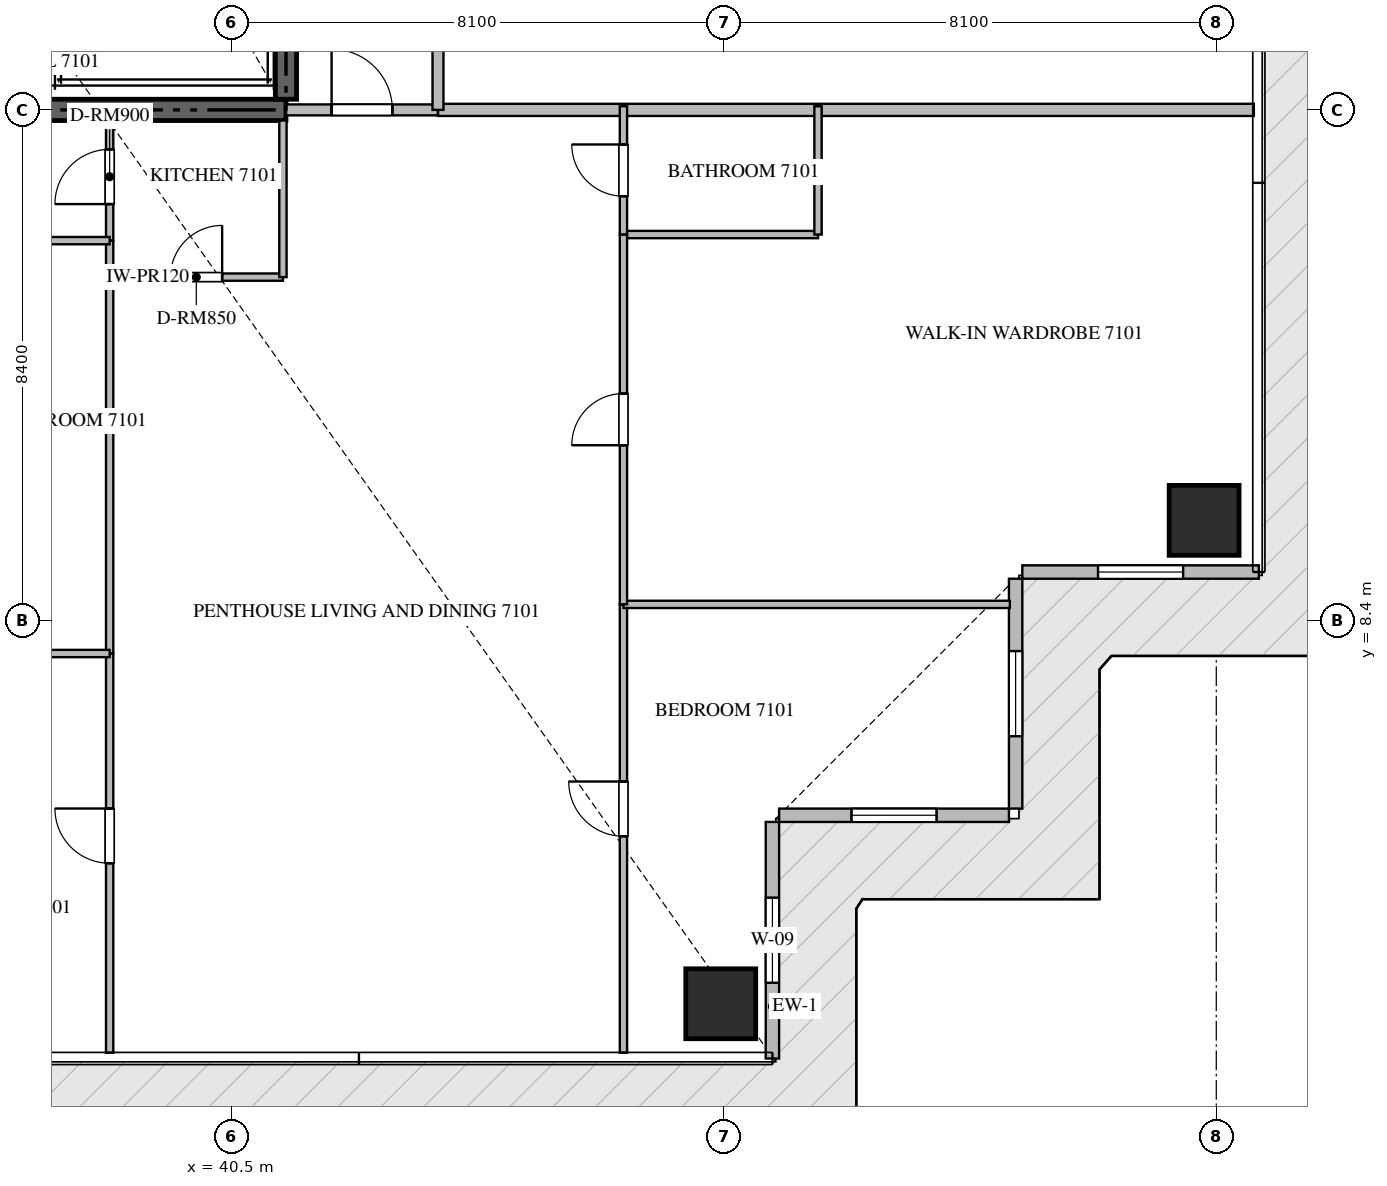
"""IFC4 building model, lengths in metres.
Left out: names, types, materials, properties, quantities, classifications, styles, units other than length and angle.
Written with IfcOpenShell. Run it as: python <this file> out.ifc"""

import sys

from ifc_helpers import new_model, si_unit, direction, frame, frame_2d, origin, origin_2d, place, context, subcontext, project, spatial, rectangle, extrude, source, transform, mapped, element, fill, save


model = new_model("IFC4")
c1 = context("Model", 3, precision=1e-05, world=origin(), true_north=direction((0.0, 1.0)))
c2 = subcontext(c1, "Body", "Model", "MODEL_VIEW")
j1 = project(units=[si_unit("LENGTHUNIT", "METRE"), si_unit("PLANEANGLEUNIT", "RADIAN")], contexts=[c1])
p1 = place(None, origin())
s1 = spatial("IfcSite", under=j1, at=p1, CompositionType="ELEMENT")
p2 = place(p1, origin())
s2 = spatial("IfcBuilding", under=s1, at=p2, CompositionType="ELEMENT")
p3 = place(p2, frame((0.0, 0.0, 283.6)))
s3 = spatial("IfcBuildingStorey", under=s2, at=p3, CompositionType="ELEMENT", Elevation=283.6)
p4 = place(p3, frame((23.4, 16.8, -0.26), z_axis=(0.0, 0.0, 1.0), x_axis=(1.0, 0.0, 0.0)))
e1 = element("IfcWall", 1, at=p4, inside=s3, PredefinedType="SHEAR", context=c2, shape_type="SweptSolid", body=[
    extrude(rectangle(XDim=18.0, YDim=0.35, at=frame_2d((9.0, 0.0))), origin(), (0.0, 0.0, 1.0), 3.668),
])
p5 = place(p3, frame((41.4, 16.975, -0.26), z_axis=(0.0, 0.0, 1.0), x_axis=(0.0, 1.0, 0.0)))
e2 = element("IfcWall", 2, at=p5, inside=s3, PredefinedType="SHEAR", context=c2, shape_type="SweptSolid", body=[
    extrude(rectangle(XDim=8.375, YDim=0.35, at=frame_2d((4.188, 0.0))), origin(), (0.0, 0.0, 1.0), 3.668),
])
m1 = source(origin(), c2, "Body", "SweptSolid", [
    extrude(rectangle(XDim=1.15, YDim=1.15, at=origin_2d()), origin(), (0.0, 0.0, 1.0), 3.67),
])
for number, where, z_axis, x_axis in (
    (3, (48.55, 2.1, -0.26), (0.0, 0.0, 1.0), (1.0, 0.0, 0.0)),
    (4, (56.5, 10.05, -0.26), (0.0, 0.0, 1.0), (1.0, 0.0, 0.0)),
):
    element("IfcColumn", number, at=place(p3, frame(where, z_axis=z_axis, x_axis=x_axis)), inside=s3, PredefinedType="COLUMN", context=c2, shape_type="MappedRepresentation", body=[
        mapped(m1, transform((0.0, 0.0, 0.0), scale=1.0)),
    ])
p6 = place(p3, frame((49.4, 1.2, 0.0), z_axis=(0.0, 0.0, 1.0), x_axis=(0.0, 1.0, 0.0)))
e5 = element("IfcWall", 5, at=p6, inside=s3, PredefinedType="ELEMENTEDWALL", context=c2, shape_type="SweptSolid", body=[
    extrude(rectangle(XDim=3.89, YDim=0.22, at=frame_2d((1.945, 0.0))), origin(), (0.0, 0.0, 1.0), 3.395),
])
p7 = place(p6, frame((1.245, 0.0, 0.65)))
e6 = element("IfcOpeningElement", 6, at=p7, cuts=e5, PredefinedType="OPENING", context=c2, shape_type="SweptSolid", body=[
    extrude(rectangle(XDim=1.4, YDim=1.35, at=frame_2d((0.7, 0.675))), frame((0.0, 0.12, 0.0), z_axis=(0.0, -1.0, 0.0), x_axis=(1.0, 0.0, 0.0)), (0.0, 0.0, 1.0), 0.24),
])
p8 = place(p3, frame((49.51, 5.2, 0.0), z_axis=(0.0, 0.0, 1.0), x_axis=(1.0, 0.0, 0.0)))
e7 = element("IfcWall", 7, at=p8, inside=s3, PredefinedType="ELEMENTEDWALL", context=c2, shape_type="SweptSolid", body=[
    extrude(rectangle(XDim=3.78, YDim=0.22, at=frame_2d((1.89, 0.0))), origin(), (0.0, 0.0, 1.0), 3.395),
])
p9 = place(p8, frame((1.19, 0.0, 0.65)))
e8 = element("IfcOpeningElement", 8, at=p9, cuts=e7, PredefinedType="OPENING", context=c2, shape_type="SweptSolid", body=[
    extrude(rectangle(XDim=1.4, YDim=1.35, at=frame_2d((0.7, 0.675))), frame((0.0, 0.12, 0.0), z_axis=(0.0, -1.0, 0.0), x_axis=(1.0, 0.0, 0.0)), (0.0, 0.0, 1.0), 0.24),
])
p10 = place(p3, frame((53.4, 5.31, 0.0), z_axis=(0.0, 0.0, 1.0), x_axis=(0.0, 1.0, 0.0)))
e9 = element("IfcWall", 9, at=p10, inside=s3, PredefinedType="ELEMENTEDWALL", context=c2, shape_type="SweptSolid", body=[
    extrude(rectangle(XDim=3.78, YDim=0.22, at=frame_2d((1.89, 0.0))), origin(), (0.0, 0.0, 1.0), 3.395),
])
p11 = place(p10, frame((1.19, 0.0, 0.65)))
e10 = element("IfcOpeningElement", 10, at=p11, cuts=e9, PredefinedType="OPENING", context=c2, shape_type="SweptSolid", body=[
    extrude(rectangle(XDim=1.4, YDim=1.35, at=frame_2d((0.7, 0.675))), frame((0.0, 0.12, 0.0), z_axis=(0.0, -1.0, 0.0), x_axis=(1.0, 0.0, 0.0)), (0.0, 0.0, 1.0), 0.24),
])
p12 = place(p3, frame((53.51, 9.2, 0.0), z_axis=(0.0, 0.0, 1.0), x_axis=(1.0, 0.0, 0.0)))
e11 = element("IfcWall", 11, at=p12, inside=s3, PredefinedType="ELEMENTEDWALL", context=c2, shape_type="SweptSolid", body=[
    extrude(rectangle(XDim=3.89, YDim=0.22, at=frame_2d((1.945, 0.0))), origin(), (0.0, 0.0, 1.0), 3.395),
])
p13 = place(p12, frame((1.245, 0.0, 0.65)))
e12 = element("IfcOpeningElement", 12, at=p13, cuts=e11, PredefinedType="OPENING", context=c2, shape_type="SweptSolid", body=[
    extrude(rectangle(XDim=1.4, YDim=1.35, at=frame_2d((0.7, 0.675))), frame((0.0, 0.12, 0.0), z_axis=(0.0, -1.0, 0.0), x_axis=(1.0, 0.0, 0.0)), (0.0, 0.0, 1.0), 0.24),
])
p14 = place(p3, frame((43.9, 16.8, 0.0), z_axis=(0.0, 0.0, 1.0), x_axis=(1.0, 0.0, 0.0)))
e13 = element("IfcWall", 13, at=p14, inside=s3, PredefinedType="PARTITIONING", context=c2, shape_type="SweptSolid", body=[
    extrude(rectangle(XDim=13.418, YDim=0.2, at=frame_2d((6.709, 0.0))), origin(), (0.0, 0.0, 1.0), 3.41),
])
p15 = place(p3, frame((41.402, 16.8, 0.0), z_axis=(0.0, 0.0, 1.0), x_axis=(1.0, 0.0, 0.0)))
e14 = element("IfcWall", 14, at=p15, inside=s3, PredefinedType="PARTITIONING", context=c2, shape_type="SweptSolid", body=[
    extrude(rectangle(XDim=2.496, YDim=0.18, at=frame_2d((1.248, 0.0))), origin(), (0.0, 0.0, 1.0), 3.41),
])
p16 = place(p15, frame((0.748, 0.0, 0.0)))
e15 = element("IfcOpeningElement", 15, at=p16, cuts=e14, PredefinedType="OPENING", context=c2, shape_type="SweptSolid", body=[
    extrude(rectangle(XDim=1.0, YDim=2.15, at=frame_2d((0.5, 1.075))), frame((0.0, 0.1, 0.0), z_axis=(0.0, -1.0, 0.0), x_axis=(1.0, 0.0, 0.0)), (0.0, 0.0, 1.0), 0.2),
])
p17 = place(p3, frame((43.9, 16.8, 0.0), z_axis=(0.0, 0.0, 1.0), x_axis=(0.0, 1.0, 0.0)))
e16 = element("IfcWall", 16, at=p17, inside=s3, PredefinedType="PARTITIONING", context=c2, shape_type="SweptSolid", body=[
    extrude(rectangle(XDim=16.8, YDim=0.18, at=frame_2d((8.4, 0.0))), origin(), (0.0, 0.0, 1.0), 3.41),
])
p18 = place(p17, frame((1.3, 0.0, 0.0)))
e17 = element("IfcOpeningElement", 17, at=p18, cuts=e16, PredefinedType="OPENING", context=c2, shape_type="SweptSolid", body=[
    extrude(rectangle(XDim=1.0, YDim=2.15, at=frame_2d((0.5, 1.075))), frame((0.0, 0.1, 0.0), z_axis=(0.0, -1.0, 0.0), x_axis=(1.0, 0.0, 0.0)), (0.0, 0.0, 1.0), 0.2),
])
p19 = place(p3, frame((38.5, 14.05, 0.0), z_axis=(0.0, 0.0, 1.0), x_axis=(1.0, 0.0, 0.0)))
e18 = element("IfcWall", 18, at=p19, inside=s3, PredefinedType="PARTITIONING", context=c2, shape_type="SweptSolid", body=[
    extrude(rectangle(XDim=2.85, YDim=0.12, at=frame_2d((1.425, 0.0))), origin(), (0.0, 0.0, 1.0), 3.41),
])
p20 = place(p19, frame((1.0, 0.0, 0.0)))
e19 = element("IfcOpeningElement", 19, at=p20, cuts=e18, PredefinedType="OPENING", context=c2, shape_type="SweptSolid", body=[
    extrude(rectangle(XDim=0.85, YDim=2.1, at=frame_2d((0.425, 1.05))), frame((0.0, 0.07, 0.0), z_axis=(0.0, -1.0, 0.0), x_axis=(1.0, 0.0, 0.0)), (0.0, 0.0, 1.0), 0.14),
])
p21 = place(p3, frame((41.35, 14.05, 0.0), z_axis=(0.0, 0.0, 1.0), x_axis=(0.0, 1.0, 0.0)))
e20 = element("IfcWall", 20, at=p21, inside=s3, PredefinedType="PARTITIONING", context=c2, shape_type="SweptSolid", body=[
    extrude(rectangle(XDim=2.575, YDim=0.12, at=frame_2d((1.288, 0.0))), origin(), (0.0, 0.0, 1.0), 3.41),
])
p22 = place(p3, frame((38.5, 14.65, 0.0), z_axis=(0.0, 0.0, 1.0), x_axis=(0.0, 1.0, 0.0)))
e21 = element("IfcWall", 21, at=p22, inside=s3, PredefinedType="PARTITIONING", context=c2, shape_type="SweptSolid", body=[
    extrude(rectangle(XDim=1.975, YDim=0.12, at=frame_2d((0.988, 0.0))), origin(), (0.0, 0.0, 1.0), 3.41),
])
p23 = place(p22, frame((0.601, 0.0, 0.0)))
e22 = element("IfcOpeningElement", 22, at=p23, cuts=e21, PredefinedType="OPENING", context=c2, shape_type="SweptSolid", body=[
    extrude(rectangle(XDim=0.9, YDim=2.1, at=frame_2d((0.45, 1.05))), frame((0.0, 0.07, 0.0), z_axis=(0.0, -1.0, 0.0), x_axis=(1.0, 0.0, 0.0)), (0.0, 0.0, 1.0), 0.14),
])
p24 = place(p3, frame((38.5, 1.295, 0.0), z_axis=(0.0, 0.0, 1.0), x_axis=(0.0, 1.0, 0.0)))
e23 = element("IfcWall", 23, at=p24, inside=s3, PredefinedType="PARTITIONING", context=c2, shape_type="SweptSolid", body=[
    extrude(rectangle(XDim=6.565, YDim=0.12, at=frame_2d((3.283, 0.0))), origin(), (0.0, 0.0, 1.0), 3.41),
])
p25 = place(p24, frame((3.116, 0.0, 0.0)))
e24 = element("IfcOpeningElement", 24, at=p25, cuts=e23, PredefinedType="OPENING", context=c2, shape_type="SweptSolid", body=[
    extrude(rectangle(XDim=0.9, YDim=2.1, at=frame_2d((0.45, 1.05))), frame((0.0, 0.07, 0.0), z_axis=(0.0, -1.0, 0.0), x_axis=(1.0, 0.0, 0.0)), (0.0, 0.0, 1.0), 0.14),
])
p26 = place(p3, frame((38.5, 7.862, 0.0), z_axis=(0.0, 0.0, 1.0), x_axis=(0.0, 1.0, 0.0)))
e25 = element("IfcWall", 25, at=p26, inside=s3, PredefinedType="PARTITIONING", context=c2, shape_type="SweptSolid", body=[
    extrude(rectangle(XDim=6.786, YDim=0.12, at=frame_2d((3.393, 0.0))), origin(), (0.0, 0.0, 1.0), 3.41),
])
p27 = place(p3, frame((33.35, 7.86, 0.0), z_axis=(0.0, 0.0, 1.0), x_axis=(1.0, 0.0, 0.0)))
e26 = element("IfcWall", 26, at=p27, inside=s3, PredefinedType="PARTITIONING", context=c2, shape_type="SweptSolid", body=[
    extrude(rectangle(XDim=5.15, YDim=0.12, at=frame_2d((2.575, 0.0))), origin(), (0.0, 0.0, 1.0), 3.41),
])
p28 = place(p3, frame((35.452, 14.65, 0.0), z_axis=(0.0, 0.0, 1.0), x_axis=(1.0, 0.0, 0.0)))
e27 = element("IfcWall", 27, at=p28, inside=s3, PredefinedType="PARTITIONING", context=c2, shape_type="SweptSolid", body=[
    extrude(rectangle(XDim=3.048, YDim=0.12, at=frame_2d((1.524, 0.0))), origin(), (0.0, 0.0, 1.0), 3.41),
])
p29 = place(p28, frame((1.099, 0.0, 0.0)))
e28 = element("IfcOpeningElement", 28, at=p29, cuts=e27, PredefinedType="OPENING", context=c2, shape_type="SweptSolid", body=[
    extrude(rectangle(XDim=0.85, YDim=2.1, at=frame_2d((0.425, 1.05))), frame((0.0, 0.07, 0.0), z_axis=(0.0, -1.0, 0.0), x_axis=(1.0, 0.0, 0.0)), (0.0, 0.0, 1.0), 0.14),
])
p30 = place(p3, frame((46.95, 1.295, 0.0), z_axis=(0.0, 0.0, 1.0), x_axis=(0.0, 1.0, 0.0)))
e29 = element("IfcWall", 29, at=p30, inside=s3, PredefinedType="PARTITIONING", context=c2, shape_type="SweptSolid", body=[
    extrude(rectangle(XDim=7.373, YDim=0.12, at=frame_2d((3.687, 0.0))), origin(), (0.0, 0.0, 1.0), 3.41),
])
p31 = place(p30, frame((3.56, 0.0, 0.0)))
e30 = element("IfcOpeningElement", 30, at=p31, cuts=e29, PredefinedType="OPENING", context=c2, shape_type="SweptSolid", body=[
    extrude(rectangle(XDim=0.9, YDim=2.1, at=frame_2d((0.45, 1.05))), frame((0.0, 0.07, 0.0), z_axis=(0.0, -1.0, 0.0), x_axis=(1.0, 0.0, 0.0)), (0.0, 0.0, 1.0), 0.14),
])
p32 = place(p3, frame((46.95, 8.668, 0.0), z_axis=(0.0, 0.0, 1.0), x_axis=(1.0, 0.0, 0.0)))
e31 = element("IfcWall", 31, at=p32, inside=s3, PredefinedType="PARTITIONING", context=c2, shape_type="SweptSolid", body=[
    extrude(rectangle(XDim=6.355, YDim=0.12, at=frame_2d((3.177, 0.0))), origin(), (0.0, 0.0, 1.0), 3.41),
])
p33 = place(p3, frame((46.95, 14.75, 0.0), z_axis=(0.0, 0.0, 1.0), x_axis=(1.0, 0.0, 0.0)))
e32 = element("IfcWall", 32, at=p33, inside=s3, PredefinedType="PARTITIONING", context=c2, shape_type="SweptSolid", body=[
    extrude(rectangle(XDim=3.2, YDim=0.12, at=frame_2d((1.6, 0.0))), origin(), (0.0, 0.0, 1.0), 3.41),
])
p34 = place(p3, frame((50.15, 14.75, 0.0), z_axis=(0.0, 0.0, 1.0), x_axis=(0.0, 1.0, 0.0)))
e33 = element("IfcWall", 33, at=p34, inside=s3, PredefinedType="PARTITIONING", context=c2, shape_type="SweptSolid", body=[
    extrude(rectangle(XDim=2.11, YDim=0.12, at=frame_2d((1.055, 0.0))), origin(), (0.0, 0.0, 1.0), 3.41),
])
p35 = place(p3, frame((46.95, 8.67, 0.0), z_axis=(0.0, 0.0, 1.0), x_axis=(0.0, 1.0, 0.0)))
e34 = element("IfcWall", 34, at=p35, inside=s3, PredefinedType="PARTITIONING", context=c2, shape_type="SweptSolid", body=[
    extrude(rectangle(XDim=6.08, YDim=0.12, at=frame_2d((3.04, 0.0))), origin(), (0.0, 0.0, 1.0), 3.41),
])
p36 = place(p35, frame((2.615, 0.0, 0.0)))
e35 = element("IfcOpeningElement", 35, at=p36, cuts=e34, PredefinedType="OPENING", context=c2, shape_type="SweptSolid", body=[
    extrude(rectangle(XDim=0.85, YDim=2.1, at=frame_2d((0.425, 1.05))), frame((0.0, 0.07, 0.0), z_axis=(0.0, -1.0, 0.0), x_axis=(1.0, 0.0, 0.0)), (0.0, 0.0, 1.0), 0.14),
])
p37 = place(p3, frame((46.95, 14.752, 0.0), z_axis=(0.0, 0.0, 1.0), x_axis=(0.0, 1.0, 0.0)))
e36 = element("IfcWall", 36, at=p37, inside=s3, PredefinedType="PARTITIONING", context=c2, shape_type="SweptSolid", body=[
    extrude(rectangle(XDim=2.108, YDim=0.12, at=frame_2d((1.054, 0.0))), origin(), (0.0, 0.0, 1.0), 3.41),
])
p38 = place(p37, frame((0.629, 0.0, 0.0)))
e37 = element("IfcOpeningElement", 37, at=p38, cuts=e36, PredefinedType="OPENING", context=c2, shape_type="SweptSolid", body=[
    extrude(rectangle(XDim=0.85, YDim=2.1, at=frame_2d((0.425, 1.05))), frame((0.0, 0.07, 0.0), z_axis=(0.0, -1.0, 0.0), x_axis=(1.0, 0.0, 0.0)), (0.0, 0.0, 1.0), 0.14),
])
m2 = source(origin(), c2, "Body", "SweptSolid", [
    extrude(rectangle(XDim=1.4, YDim=1.35, at=frame_2d((0.7, 0.675))), frame((0.0, 0.03, 0.0), z_axis=(0.0, -1.0, 0.0), x_axis=(1.0, 0.0, 0.0)), (0.0, 0.0, 1.0), 0.06),
])
p39 = place(p7, origin())
e38 = element("IfcWindow", 38, at=p39, inside=s3, PartitioningType="SINGLE_PANEL", PredefinedType="WINDOW", context=c2, shape_type="MappedRepresentation", body=[
    mapped(m2, transform((0.0, 0.0, 0.0), scale=1.0)),
])
fill(e6, e38)
p40 = place(p9, origin())
e39 = element("IfcWindow", 39, at=p40, inside=s3, PartitioningType="SINGLE_PANEL", PredefinedType="WINDOW", context=c2, shape_type="MappedRepresentation", body=[
    mapped(m2, transform((0.0, 0.0, 0.0), scale=1.0)),
])
fill(e8, e39)
p41 = place(p11, origin())
e40 = element("IfcWindow", 40, at=p41, inside=s3, PartitioningType="SINGLE_PANEL", PredefinedType="WINDOW", context=c2, shape_type="MappedRepresentation", body=[
    mapped(m2, transform((0.0, 0.0, 0.0), scale=1.0)),
])
fill(e10, e40)
p42 = place(p13, origin())
e41 = element("IfcWindow", 41, at=p42, inside=s3, PartitioningType="SINGLE_PANEL", PredefinedType="WINDOW", context=c2, shape_type="MappedRepresentation", body=[
    mapped(m2, transform((0.0, 0.0, 0.0), scale=1.0)),
])
fill(e12, e41)
m3 = source(origin(), c2, "Body", "SweptSolid", [
    extrude(rectangle(XDim=1.0, YDim=2.15, at=frame_2d((0.5, 1.075))), frame((0.0, 0.025, 0.0), z_axis=(0.0, -1.0, 0.0), x_axis=(1.0, 0.0, 0.0)), (0.0, 0.0, 1.0), 0.05),
])
p43 = place(p16, origin())
e42 = element("IfcDoor", 42, at=p43, inside=s3, OperationType="SINGLE_SWING_LEFT", PredefinedType="DOOR", context=c2, shape_type="MappedRepresentation", body=[
    mapped(m3, transform((0.0, 0.0, 0.0), scale=1.0)),
])
fill(e15, e42)
m4 = source(origin(), c2, "Body", "SweptSolid", [
    extrude(rectangle(XDim=0.85, YDim=2.1, at=frame_2d((0.425, 1.05))), frame((0.0, 0.025, 0.0), z_axis=(0.0, -1.0, 0.0), x_axis=(1.0, 0.0, 0.0)), (0.0, 0.0, 1.0), 0.05),
])
p44 = place(p20, origin())
e43 = element("IfcDoor", 43, at=p44, inside=s3, OperationType="SINGLE_SWING_RIGHT", PredefinedType="DOOR", context=c2, shape_type="MappedRepresentation", body=[
    mapped(m4, transform((0.0, 0.0, 0.0), scale=1.0)),
])
fill(e19, e43)
m5 = source(origin(), c2, "Body", "SweptSolid", [
    extrude(rectangle(XDim=0.9, YDim=2.1, at=frame_2d((0.45, 1.05))), frame((0.0, 0.025, 0.0), z_axis=(0.0, -1.0, 0.0), x_axis=(1.0, 0.0, 0.0)), (0.0, 0.0, 1.0), 0.05),
])
p45 = place(p23, origin())
e44 = element("IfcDoor", 44, at=p45, inside=s3, OperationType="SINGLE_SWING_LEFT", PredefinedType="DOOR", context=c2, shape_type="MappedRepresentation", body=[
    mapped(m5, transform((0.0, 0.0, 0.0), scale=1.0)),
])
fill(e22, e44)
p46 = place(p25, origin())
e45 = element("IfcDoor", 45, at=p46, inside=s3, OperationType="SINGLE_SWING_RIGHT", PredefinedType="DOOR", context=c2, shape_type="MappedRepresentation", body=[
    mapped(m5, transform((0.0, 0.0, 0.0), scale=1.0)),
])
fill(e24, e45)
p47 = place(p31, origin())
e46 = element("IfcDoor", 46, at=p47, inside=s3, OperationType="SINGLE_SWING_RIGHT", PredefinedType="DOOR", context=c2, shape_type="MappedRepresentation", body=[
    mapped(m5, transform((0.0, 0.0, 0.0), scale=1.0)),
])
fill(e30, e46)
p48 = place(p36, origin())
e47 = element("IfcDoor", 47, at=p48, inside=s3, OperationType="SINGLE_SWING_LEFT", PredefinedType="DOOR", context=c2, shape_type="MappedRepresentation", body=[
    mapped(m4, transform((0.0, 0.0, 0.0), scale=1.0)),
])
fill(e35, e47)
p49 = place(p38, origin())
e48 = element("IfcDoor", 48, at=p49, inside=s3, OperationType="SINGLE_SWING_RIGHT", PredefinedType="DOOR", context=c2, shape_type="MappedRepresentation", body=[
    mapped(m4, transform((0.0, 0.0, 0.0), scale=1.0)),
])
fill(e37, e48)
save(model, sys.argv[1])
